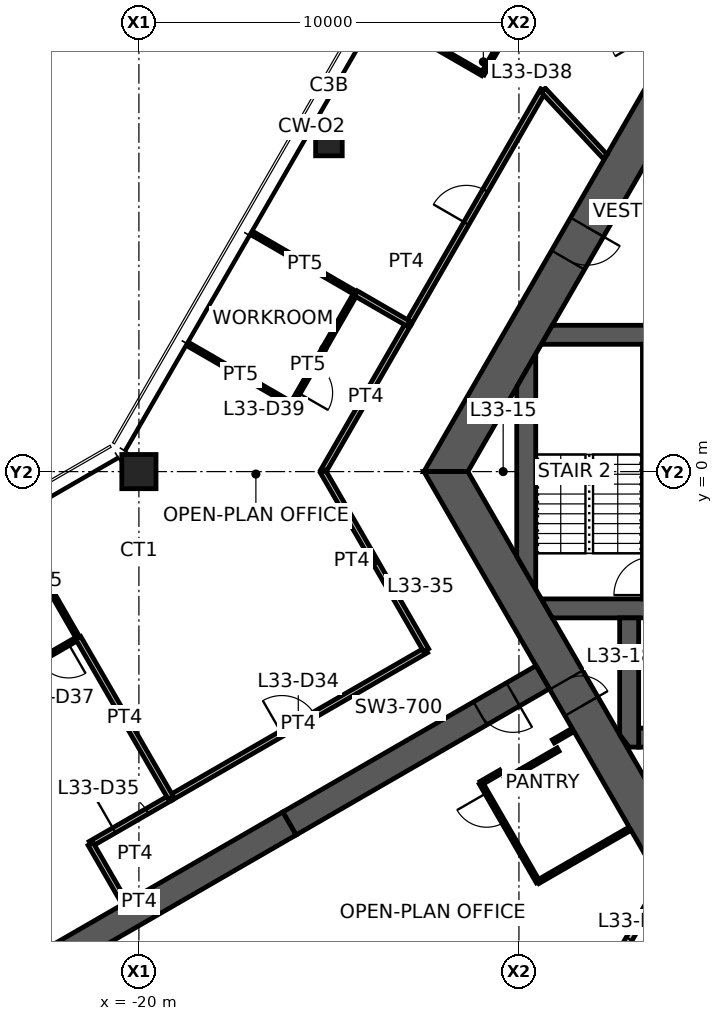
"""IFC4 building model, lengths in metres.
Left out: names, types, materials, properties, quantities, classifications, styles, units other than length and angle.
Written with IfcOpenShell. Run it as: python <this file> out.ifc"""

import sys

from ifc_helpers import new_model, si_unit, direction, frame, frame_2d, origin, origin_2d, place, context, subcontext, project, spatial, polyline, rectangle, hollow_rectangle, outline, extrude, element, fill, save


model = new_model("IFC4")
c1 = context("Model", 3, precision=1e-05, world=origin(), true_north=direction((0.0, 1.0)))
c2 = subcontext(c1, "Body", "Model", "MODEL_VIEW")
j1 = project(units=[si_unit("LENGTHUNIT", "METRE"), si_unit("PLANEANGLEUNIT", "RADIAN")], contexts=[c1])
p1 = place(None, origin())
s1 = spatial("IfcSite", under=j1, at=p1, CompositionType="ELEMENT")
p2 = place(p1, origin())
s2 = spatial("IfcBuilding", under=s1, at=p2, CompositionType="ELEMENT")
p3 = place(p2, frame((0.0, 0.0, 133.1)))
s3 = spatial("IfcBuildingStorey", under=s2, at=p3, CompositionType="ELEMENT", Elevation=133.1)
p4 = place(p3, frame((-20.0, 0.0, 0.0), z_axis=(0.0, 0.0, 1.0), x_axis=(1.0, 0.0, 0.0)))
e1 = element("IfcColumn", 1, at=p4, inside=s3, PredefinedType="COLUMN", context=c2, shape_type="SweptSolid", body=[
    extrude(hollow_rectangle(XDim=0.9, YDim=0.9, WallThickness=0.07, at=origin_2d()), origin(), (0.0, 0.0, 1.0), 3.9),
])
p5 = place(p3, frame((-15.0, 8.66, 0.0), z_axis=(0.0, 0.0, 1.0), x_axis=(1.0, 0.0, 0.0)))
e2 = element("IfcColumn", 2, at=p5, inside=s3, PredefinedType="COLUMN", context=c2, shape_type="SweptSolid", body=[
    extrude(hollow_rectangle(XDim=0.7, YDim=0.7, WallThickness=0.036, at=origin_2d()), origin(), (0.0, 0.0, 1.0), 3.9),
])
p6 = place(p3, frame((-5.961, 10.325, 0.0), z_axis=(0.0, 0.0, 1.0), x_axis=(-0.500004296715, -0.866022923061, 0.0)))
e3 = element("IfcWall", 3, at=p6, inside=s3, PredefinedType="SHEAR", context=c2, shape_type="SweptSolid", body=[
    extrude(outline(polyline([(-0.289, -0.5), (4.494, -0.5), (5.494, -0.5), (12.211, -0.5), (11.634, 0.5), (5.494, 0.5), (4.494, 0.5), (0.289, 0.5), (-0.289, -0.5)])), origin(), (0.0, 0.0, 1.0), 3.9),
])
p7 = place(p6, frame((4.494, 0.0, 0.0)))
e4 = element("IfcOpeningElement", 4, at=p7, cuts=e3, PredefinedType="OPENING", context=c2, shape_type="SweptSolid", body=[
    extrude(rectangle(XDim=1.0, YDim=2.1, at=frame_2d((0.5, 1.05))), frame((0.0, 0.51, 0.0), z_axis=(0.0, -1.0, 0.0), x_axis=(1.0, 0.0, 0.0)), (0.0, 0.0, 1.0), 1.02),
])
p8 = place(p3, frame((-11.922, 0.0, 0.0), z_axis=(0.0, 0.0, 1.0), x_axis=(0.500004296715, -0.866022923061, 0.0)))
e5 = element("IfcWall", 5, at=p8, inside=s3, PredefinedType="SHEAR", context=c2, shape_type="SweptSolid", body=[
    extrude(outline(polyline([(-0.289, -0.5), (6.331, -0.5), (7.131, -0.5), (12.211, -0.5), (11.634, 0.5), (7.131, 0.5), (6.331, 0.5), (0.289, 0.5), (-0.289, -0.5)])), origin(), (0.0, 0.0, 1.0), 3.9),
])
p9 = place(p8, frame((6.331, 0.0, 0.0)))
e6 = element("IfcOpeningElement", 6, at=p9, cuts=e5, PredefinedType="OPENING", context=c2, shape_type="SweptSolid", body=[
    extrude(rectangle(XDim=0.8, YDim=2.1, at=frame_2d((0.4, 1.05))), frame((0.0, 0.51, 0.0), z_axis=(0.0, -1.0, 0.0), x_axis=(1.0, 0.0, 0.0)), (0.0, 0.0, 1.0), 1.02),
])
p10 = place(p3, frame((-9.375, -5.413, 0.0), z_axis=(0.0, 0.0, 1.0), x_axis=(-0.866032377459, -0.499987921047, 0.0)))
e7 = element("IfcWall", 7, at=p10, inside=s3, PredefinedType="SHEAR", context=c2, shape_type="SweptSolid", body=[
    extrude(rectangle(XDim=7.696, YDim=0.7, at=frame_2d((3.848, 0.0))), origin(), (0.0, 0.0, 1.0), 3.9),
])
p11 = place(p10, frame((0.9, 0.0, 0.0)))
e8 = element("IfcOpeningElement", 8, at=p11, cuts=e7, PredefinedType="OPENING", context=c2, shape_type="SweptSolid", body=[
    extrude(rectangle(XDim=1.0, YDim=2.1, at=frame_2d((0.5, 1.05))), frame((0.0, 0.36, 0.0), z_axis=(0.0, -1.0, 0.0), x_axis=(1.0, 0.0, 0.0)), (0.0, 0.0, 1.0), 0.72),
])
p12 = place(p3, frame((-16.039, -9.26, 0.0), z_axis=(0.0, 0.0, 1.0), x_axis=(-0.866024837091, -0.50000098154, 0.0)))
e9 = element("IfcWall", 9, at=p12, inside=s3, PredefinedType="SHEAR", context=c2, shape_type="SweptSolid", body=[
    extrude(rectangle(XDim=13.0, YDim=0.7, at=frame_2d((6.5, 0.0))), origin(), (0.0, 0.0, 1.0), 3.9),
])
p13 = place(p3, frame((-9.266, 3.6, 0.0), z_axis=(0.0, 0.0, 1.0), x_axis=(1.0, 0.0, 0.0)))
e10 = element("IfcWall", 10, at=p13, inside=s3, PredefinedType="SHEAR", context=c2, shape_type="SweptSolid", body=[
    extrude(outline(polyline([(-0.144, -0.25), (3.266, -0.25), (4.266, -0.25), (5.667, -0.25), (6.767, -0.25), (7.916, -0.25), (7.916, 0.25), (6.767, 0.25), (5.667, 0.25), (4.266, 0.25), (3.266, 0.25), (0.144, 0.25), (-0.144, -0.25)])), origin(), (0.0, 0.0, 1.0), 3.9),
])
p14 = place(p13, frame((3.266, 0.0, 0.0)))
e11 = element("IfcOpeningElement", 11, at=p14, cuts=e10, PredefinedType="OPENING", context=c2, shape_type="SweptSolid", body=[
    extrude(rectangle(XDim=1.0, YDim=2.1, at=frame_2d((0.5, 1.05))), frame((0.0, 0.26, 0.0), z_axis=(0.0, -1.0, 0.0), x_axis=(1.0, 0.0, 0.0)), (0.0, 0.0, 1.0), 0.52),
])
p15 = place(p13, frame((5.667, 0.0, 0.0)))
e12 = element("IfcOpeningElement", 12, at=p15, cuts=e10, PredefinedType="OPENING", context=c2, shape_type="SweptSolid", body=[
    extrude(rectangle(XDim=1.1, YDim=2.1, at=frame_2d((0.55, 1.05))), frame((0.0, 0.26, 0.0), z_axis=(0.0, -1.0, 0.0), x_axis=(1.0, 0.0, 0.0)), (0.0, 0.0, 1.0), 0.52),
])
p16 = place(p3, frame((-9.266, -3.6, 0.0), z_axis=(0.0, 0.0, 1.0), x_axis=(1.0, 0.0, 0.0)))
e13 = element("IfcWall", 13, at=p16, inside=s3, PredefinedType="SHEAR", context=c2, shape_type="SweptSolid", body=[
    extrude(outline(polyline([(0.144, -0.25), (3.116, -0.25), (4.417, -0.25), (5.667, -0.25), (6.767, -0.25), (7.916, -0.25), (7.916, 0.25), (6.767, 0.25), (5.667, 0.25), (4.417, 0.25), (3.116, 0.25), (-0.144, 0.25), (0.144, -0.25)])), origin(), (0.0, 0.0, 1.0), 3.9),
])
p17 = place(p16, frame((5.667, 0.0, 0.0)))
e14 = element("IfcOpeningElement", 14, at=p17, cuts=e13, PredefinedType="OPENING", context=c2, shape_type="SweptSolid", body=[
    extrude(rectangle(XDim=1.1, YDim=2.1, at=frame_2d((0.55, 1.05))), frame((0.0, 0.26, 0.0), z_axis=(0.0, -1.0, 0.0), x_axis=(1.0, 0.0, 0.0)), (0.0, 0.0, 1.0), 0.52),
])
p18 = place(p16, frame((3.116, 0.0, 0.0)))
e15 = element("IfcOpeningElement", 15, at=p18, cuts=e13, PredefinedType="OPENING", context=c2, shape_type="SweptSolid", body=[
    extrude(rectangle(XDim=1.3, YDim=2.1, at=frame_2d((0.65, 1.05))), frame((0.0, 0.26, 0.0), z_axis=(0.0, -1.0, 0.0), x_axis=(1.0, 0.0, 0.0)), (0.0, 0.0, 1.0), 0.52),
])
p19 = place(p3, frame((-6.5, -3.35, 0.0), z_axis=(0.0, 0.0, 1.0), x_axis=(0.0, 1.0, 0.0)))
e16 = element("IfcWall", 16, at=p19, inside=s3, PredefinedType="SHEAR", context=c2, shape_type="SweptSolid", body=[
    extrude(rectangle(XDim=6.7, YDim=0.5, at=frame_2d((3.35, 0.0))), origin(), (0.0, 0.0, 1.0), 3.9),
])
p20 = place(p19, frame((0.1, 0.0, 0.0)))
e17 = element("IfcOpeningElement", 17, at=p20, cuts=e16, PredefinedType="OPENING", context=c2, shape_type="SweptSolid", body=[
    extrude(rectangle(XDim=1.0, YDim=2.1, at=frame_2d((0.5, 1.05))), frame((0.0, 0.26, 0.0), z_axis=(0.0, -1.0, 0.0), x_axis=(1.0, 0.0, 0.0)), (0.0, 0.0, 1.0), 0.52),
])
p21 = place(p3, frame((-6.85, -7.0, 0.0), z_axis=(0.0, 0.0, 1.0), x_axis=(1.0, 0.0, 0.0)))
e18 = element("IfcWall", 18, at=p21, inside=s3, PredefinedType="SHEAR", context=c2, shape_type="SweptSolid", body=[
    extrude(rectangle(XDim=2.1, YDim=0.5, at=frame_2d((1.05, 0.0))), origin(), (0.0, 0.0, 1.0), 3.9),
])
p22 = place(p3, frame((-7.1, -3.85, 0.0), z_axis=(0.0, 0.0, 1.0), x_axis=(0.0, -1.0, 0.0)))
e19 = element("IfcWall", 19, at=p22, inside=s3, PredefinedType="SHEAR", context=c2, shape_type="SweptSolid", body=[
    extrude(outline(polyline([(0.0, -0.25), (3.069, -0.25), (3.4, 0.0), (3.4, 0.25), (0.0, 0.25), (0.0, -0.25)])), origin(), (0.0, 0.0, 1.0), 3.9),
])
p23 = place(p3, frame((-9.808, -2.662, 0.0), z_axis=(0.0, 0.0, 1.0), x_axis=(0.0, 1.0, 0.0)))
e20 = element("IfcWall", 20, at=p23, inside=s3, PredefinedType="SHEAR", context=c2, shape_type="SweptSolid", body=[
    extrude(outline(polyline([(-0.433, -0.25), (5.758, -0.25), (4.892, 0.25), (0.433, 0.25), (-0.433, -0.25)])), origin(), (0.0, 0.0, 1.0), 3.9),
])
p24 = place(p3, frame((-6.035, 10.453, 0.0), z_axis=(0.0, 0.0, 1.0), x_axis=(-0.499989830942, 0.866031274813, 0.0)))
e21 = element("IfcWall", 21, at=p24, inside=s3, PredefinedType="PARTITIONING", context=c2, shape_type="SweptSolid", body=[
    extrude(rectangle(XDim=7.93, YDim=0.175, at=frame_2d((3.965, 0.0))), origin(), (0.0, 0.0, 1.0), 3.05),
])
p25 = place(p24, frame((1.13, 0.0, 0.0)))
e22 = element("IfcOpeningElement", 22, at=p25, cuts=e21, PredefinedType="OPENING", context=c2, shape_type="SweptSolid", body=[
    extrude(rectangle(XDim=1.0, YDim=2.1, at=frame_2d((0.5, 1.05))), frame((0.0, 0.098, 0.0), z_axis=(0.0, -1.0, 0.0), x_axis=(1.0, 0.0, 0.0)), (0.0, 0.0, 1.0), 0.195),
])
p26 = place(p3, frame((-6.035, -10.453, 0.0), z_axis=(0.0, 0.0, 1.0), x_axis=(-0.499989830942, -0.866031274813, 0.0)))
e23 = element("IfcWall", 23, at=p26, inside=s3, PredefinedType="PARTITIONING", context=c2, shape_type="SweptSolid", body=[
    extrude(rectangle(XDim=7.93, YDim=0.175, at=frame_2d((3.965, 0.0))), origin(), (0.0, 0.0, 1.0), 3.05),
])
p27 = place(p26, frame((1.13, 0.0, 0.0)))
e24 = element("IfcOpeningElement", 24, at=p27, cuts=e23, PredefinedType="OPENING", context=c2, shape_type="SweptSolid", body=[
    extrude(rectangle(XDim=1.0, YDim=2.1, at=frame_2d((0.5, 1.05))), frame((0.0, 0.098, 0.0), z_axis=(0.0, -1.0, 0.0), x_axis=(1.0, 0.0, 0.0)), (0.0, 0.0, 1.0), 0.195),
])
p28 = place(p3, frame((-19.171, -8.586, 0.0), z_axis=(0.0, 0.0, 1.0), x_axis=(0.866007176269, 0.500031569654, 0.0)))
e25 = element("IfcWall", 25, at=p28, inside=s3, PredefinedType="PARTITIONING", context=c2, shape_type="SweptSolid", body=[
    extrude(rectangle(XDim=7.771, YDim=0.15, at=frame_2d((3.885, 0.0))), origin(), (0.0, 0.0, 1.0), 2.95),
])
p29 = place(p28, frame((3.385, 0.0, 0.0)))
e26 = element("IfcOpeningElement", 26, at=p29, cuts=e25, PredefinedType="OPENING", context=c2, shape_type="SweptSolid", body=[
    extrude(rectangle(XDim=1.0, YDim=2.1, at=frame_2d((0.5, 1.05))), frame((0.0, 0.085, 0.0), z_axis=(0.0, -1.0, 0.0), x_axis=(1.0, 0.0, 0.0)), (0.0, 0.0, 1.0), 0.17),
])
p30 = place(p3, frame((-15.156, 0.0, 0.0), z_axis=(0.0, 0.0, 1.0), x_axis=(0.500014848696, 0.866016830716, 0.0)))
e27 = element("IfcWall", 27, at=p30, inside=s3, PredefinedType="PARTITIONING", context=c2, shape_type="SweptSolid", body=[
    extrude(rectangle(XDim=4.505, YDim=0.15, at=frame_2d((2.252, 0.0))), origin(), (0.0, 0.0, 1.0), 2.95),
])
p31 = place(p3, frame((-12.442, -4.7, 0.0), z_axis=(0.0, 0.0, 1.0), x_axis=(-0.500009286329, 0.866020042254, 0.0)))
e28 = element("IfcWall", 28, at=p31, inside=s3, PredefinedType="PARTITIONING", context=c2, shape_type="SweptSolid", body=[
    extrude(rectangle(XDim=5.428, YDim=0.15, at=frame_2d((2.714, 0.0))), origin(), (0.0, 0.0, 1.0), 2.95),
])
p32 = place(p3, frame((-21.271, -9.798, 0.0), z_axis=(0.0, 0.0, 1.0), x_axis=(0.866025270247, 0.500000231294, 0.0)))
e29 = element("IfcWall", 29, at=p32, inside=s3, PredefinedType="PARTITIONING", context=c2, shape_type="SweptSolid", body=[
    extrude(rectangle(XDim=2.435, YDim=0.15, at=frame_2d((1.217, 0.0))), origin(), (0.0, 0.0, 1.0), 2.95),
])
p33 = place(p32, frame((0.717, 0.0, 0.0)))
e30 = element("IfcOpeningElement", 30, at=p33, cuts=e29, PredefinedType="OPENING", context=c2, shape_type="SweptSolid", body=[
    extrude(rectangle(XDim=1.0, YDim=2.1, at=frame_2d((0.5, 1.05))), frame((0.0, 0.085, 0.0), z_axis=(0.0, -1.0, 0.0), x_axis=(1.0, 0.0, 0.0)), (0.0, 0.0, 1.0), 0.17),
])
p34 = place(p3, frame((-20.381, -11.34, 0.0), z_axis=(0.0, 0.0, 1.0), x_axis=(-0.500062787734, 0.865989150234, 0.0)))
e31 = element("IfcWall", 31, at=p34, inside=s3, PredefinedType="PARTITIONING", context=c2, shape_type="SweptSolid", body=[
    extrude(rectangle(XDim=1.78, YDim=0.15, at=frame_2d((0.89, 0.0))), origin(), (0.0, 0.0, 1.0), 2.95),
])
p35 = place(p3, frame((-12.908, 3.893, 0.0), z_axis=(0.0, 0.0, 1.0), x_axis=(0.500006411147, 0.866021702275, 0.0)))
e32 = element("IfcWall", 32, at=p35, inside=s3, PredefinedType="PARTITIONING", context=c2, shape_type="SweptSolid", body=[
    extrude(rectangle(XDim=7.095, YDim=0.15, at=frame_2d((3.548, 0.0))), origin(), (0.0, 0.0, 1.0), 2.95),
])
p36 = place(p35, frame((3.047, 0.0, 0.0)))
e33 = element("IfcOpeningElement", 33, at=p36, cuts=e32, PredefinedType="OPENING", context=c2, shape_type="SweptSolid", body=[
    extrude(rectangle(XDim=1.0, YDim=2.1, at=frame_2d((0.5, 1.05))), frame((0.0, 0.085, 0.0), z_axis=(0.0, -1.0, 0.0), x_axis=(1.0, 0.0, 0.0)), (0.0, 0.0, 1.0), 0.17),
])
p37 = place(p3, frame((-9.36, 10.038, 0.0), z_axis=(0.0, 0.0, 1.0), x_axis=(0.681997114248, -0.731354863358, 0.0)))
e34 = element("IfcWall", 34, at=p37, inside=s3, PredefinedType="PARTITIONING", context=c2, shape_type="SweptSolid", body=[
    extrude(outline(polyline([(0.0, -0.075), (2.384, -0.075), (2.384, 0.0), (2.382, 0.075), (0.0, 0.075), (0.0, -0.075)])), origin(), (0.0, 0.0, 1.0), 2.95),
])
p38 = place(p3, frame((-23.332, -1.37, 0.0), z_axis=(0.0, 0.0, 1.0), x_axis=(0.498863855434, -0.86668036423, 0.0)))
e35 = element("IfcWall", 35, at=p38, inside=s3, PredefinedType="PARTITIONING", context=c2, shape_type="SweptSolid", body=[
    extrude(rectangle(XDim=3.48, YDim=0.1, at=frame_2d((1.74, 0.0))), origin(), (0.0, 0.0, 1.0), 2.95),
])
p39 = place(p3, frame((-21.594, -4.379, 0.0), z_axis=(0.0, 0.0, 1.0), x_axis=(-0.865682888643, -0.500592784916, 0.0)))
e36 = element("IfcWall", 36, at=p39, inside=s3, PredefinedType="PARTITIONING", context=c2, shape_type="SweptSolid", body=[
    extrude(rectangle(XDim=6.62, YDim=0.1, at=frame_2d((3.31, 0.0))), origin(), (0.0, 0.0, 1.0), 2.95),
])
p40 = place(p39, frame((0.3, 0.0, 0.0)))
e37 = element("IfcOpeningElement", 37, at=p40, cuts=e36, PredefinedType="OPENING", context=c2, shape_type="SweptSolid", body=[
    extrude(rectangle(XDim=0.9, YDim=2.1, at=frame_2d((0.45, 1.05))), frame((0.0, 0.06, 0.0), z_axis=(0.0, -1.0, 0.0), x_axis=(1.0, 0.0, 0.0)), (0.0, 0.0, 1.0), 0.12),
])
p41 = place(p3, frame((-10.956, 10.465, 0.0), z_axis=(0.0, 0.0, 1.0), x_axis=(-0.866012296238, 0.500022702249, 0.0)))
e38 = element("IfcWall", 38, at=p41, inside=s3, PredefinedType="PARTITIONING", context=c2, shape_type="SweptSolid", body=[
    extrude(rectangle(XDim=3.144, YDim=0.1, at=frame_2d((1.572, 0.0))), origin(), (0.0, 0.0, 1.0), 2.95),
])
p42 = place(p3, frame((-9.291, 13.349, 0.0), z_axis=(0.0, 0.0, 1.0), x_axis=(-0.500033344505, -0.86600615147, 0.0)))
e39 = element("IfcWall", 39, at=p42, inside=s3, PredefinedType="PARTITIONING", context=c2, shape_type="SweptSolid", body=[
    extrude(rectangle(XDim=3.331, YDim=0.1, at=frame_2d((1.666, 0.0))), origin(), (0.0, 0.0, 1.0), 2.95),
])
p43 = place(p42, frame((0.3, 0.0, 0.0)))
e40 = element("IfcOpeningElement", 40, at=p43, cuts=e39, PredefinedType="OPENING", context=c2, shape_type="SweptSolid", body=[
    extrude(rectangle(XDim=0.9, YDim=2.1, at=frame_2d((0.45, 1.05))), frame((0.0, 0.06, 0.0), z_axis=(0.0, -1.0, 0.0), x_axis=(1.0, 0.0, 0.0)), (0.0, 0.0, 1.0), 0.12),
])
p44 = place(p3, frame((-15.974, 1.773, 0.0), z_axis=(0.0, 0.0, 1.0), x_axis=(-0.866032025414, 0.499988530825, 0.0)))
e41 = element("IfcWall", 41, at=p44, inside=s3, PredefinedType="PARTITIONING", context=c2, shape_type="SweptSolid", body=[
    extrude(rectangle(XDim=3.124, YDim=0.1, at=frame_2d((1.562, 0.0))), origin(), (0.0, 0.0, 1.0), 2.95),
])
p45 = place(p3, frame((-14.291, 4.698, 0.0), z_axis=(0.0, 0.0, 1.0), x_axis=(-0.498809626432, -0.86671157635, 0.0)))
e42 = element("IfcWall", 42, at=p45, inside=s3, PredefinedType="PARTITIONING", context=c2, shape_type="SweptSolid", body=[
    extrude(rectangle(XDim=3.374, YDim=0.1, at=frame_2d((1.687, 0.0))), origin(), (0.0, 0.0, 1.0), 2.95),
])
p46 = place(p45, frame((2.131, 0.0, 0.0)))
e43 = element("IfcOpeningElement", 43, at=p46, cuts=e42, PredefinedType="OPENING", context=c2, shape_type="SweptSolid", body=[
    extrude(rectangle(XDim=0.9, YDim=2.1, at=frame_2d((0.45, 1.05))), frame((0.0, 0.06, 0.0), z_axis=(0.0, -1.0, 0.0), x_axis=(1.0, 0.0, 0.0)), (0.0, 0.0, 1.0), 0.12),
])
p47 = place(p3, frame((-16.976, 6.248, 0.0), z_axis=(0.0, 0.0, 1.0), x_axis=(0.865232439327, -0.501370946442, 0.0)))
e44 = element("IfcWall", 44, at=p47, inside=s3, PredefinedType="PARTITIONING", context=c2, shape_type="SweptSolid", body=[
    extrude(rectangle(XDim=3.105, YDim=0.1, at=frame_2d((1.553, 0.0))), origin(), (0.0, 0.0, 1.0), 2.95),
])
p48 = place(p3, frame((-19.163, -8.581, 0.0), z_axis=(0.0, 0.0, 1.0), x_axis=(-0.500843945189, 0.865537603209, 0.0)))
e45 = element("IfcWall", 45, at=p48, inside=s3, PredefinedType="PARTITIONING", context=c2, shape_type="SweptSolid", body=[
    extrude(rectangle(XDim=4.854, YDim=0.15, at=frame_2d((2.427, 0.0))), origin(), (0.0, 0.0, 1.0), 2.95),
])
p49 = place(p3, frame((-14.289, 4.691, 0.0), z_axis=(0.0, 0.0, 1.0), x_axis=(0.865925490132, -0.500173015605, 0.0)))
e46 = element("IfcWall", 46, at=p49, inside=s3, PredefinedType="PARTITIONING", context=c2, shape_type="SweptSolid", body=[
    extrude(rectangle(XDim=1.595, YDim=0.15, at=frame_2d((0.797, 0.0))), origin(), (0.0, 0.0, 1.0), 2.95),
])
p50 = place(p3, frame((-11.0, -8.198, 0.0), z_axis=(0.0, 0.0, 1.0), x_axis=(0.866131372301, 0.499816412211, 0.0)))
e47 = element("IfcWall", 47, at=p50, inside=s3, PredefinedType="PARTITIONING", context=c2, shape_type="SweptSolid", body=[
    extrude(rectangle(XDim=0.6, YDim=0.1, at=frame_2d((0.3, 0.0))), origin(), (0.0, 0.0, 1.0), 2.95),
])
p51 = place(p3, frame((-10.355, -8.115, 0.0), z_axis=(0.0, 0.0, 1.0), x_axis=(0.866094119867, 0.499880961361, 0.0)))
e48 = element("IfcWall", 48, at=p51, inside=s3, PredefinedType="PARTITIONING", context=c2, shape_type="SweptSolid", body=[
    extrude(rectangle(XDim=1.6, YDim=0.1, at=frame_2d((0.8, 0.0))), origin(), (0.0, 0.0, 1.0), 2.95),
])
p52 = place(p3, frame((-9.5, -10.796, 0.0), z_axis=(0.0, 0.0, 1.0), x_axis=(-0.499990139034, 0.866031096941, 0.0)))
e49 = element("IfcWall", 49, at=p52, inside=s3, PredefinedType="PARTITIONING", context=c2, shape_type="SweptSolid", body=[
    extrude(rectangle(XDim=3.0, YDim=0.1, at=frame_2d((1.5, 0.0))), origin(), (0.0, 0.0, 1.0), 2.95),
])
p53 = place(p52, frame((1.8, 0.0, 0.0)))
e50 = element("IfcOpeningElement", 50, at=p53, cuts=e49, PredefinedType="OPENING", context=c2, shape_type="SweptSolid", body=[
    extrude(rectangle(XDim=0.9, YDim=2.1, at=frame_2d((0.45, 1.05))), frame((0.0, 0.06, 0.0), z_axis=(0.0, -1.0, 0.0), x_axis=(1.0, 0.0, 0.0)), (0.0, 0.0, 1.0), 0.12),
])
p54 = place(p3, frame((-9.094, -7.098, 0.0), z_axis=(0.0, 0.0, 1.0), x_axis=(0.865954211699, 0.50012328804, 0.0)))
e51 = element("IfcWall", 51, at=p54, inside=s3, PredefinedType="PARTITIONING", context=c2, shape_type="SweptSolid", body=[
    extrude(rectangle(XDim=0.58, YDim=0.1, at=frame_2d((0.29, 0.0))), origin(), (0.0, 0.0, 1.0), 2.95),
])
p55 = place(p3, frame((-7.092, -9.406, 0.0), z_axis=(0.0, 0.0, 1.0), x_axis=(-0.86603494908, -0.499983466698, 0.0)))
e52 = element("IfcWall", 52, at=p55, inside=s3, PredefinedType="PARTITIONING", context=c2, shape_type="SweptSolid", body=[
    extrude(rectangle(XDim=2.78, YDim=0.1, at=frame_2d((1.39, 0.0))), origin(), (0.0, 0.0, 1.0), 2.95),
])
p56 = place(p9, origin())
e53 = element("IfcDoor", 53, at=p56, inside=s3, OperationType="SINGLE_SWING_RIGHT", PredefinedType="DOOR", context=c2, shape_type="SweptSolid", body=[
    extrude(rectangle(XDim=0.8, YDim=2.1, at=frame_2d((0.4, 1.05))), frame((0.0, 0.025, 0.0), z_axis=(0.0, -1.0, 0.0), x_axis=(1.0, 0.0, 0.0)), (0.0, 0.0, 1.0), 0.05),
])
fill(e6, e53)
p57 = place(p7, origin())
e54 = element("IfcDoor", 54, at=p57, inside=s3, OperationType="SINGLE_SWING_LEFT", PredefinedType="DOOR", context=c2, shape_type="SweptSolid", body=[
    extrude(rectangle(XDim=1.0, YDim=2.1, at=frame_2d((0.5, 1.05))), frame((0.0, 0.025, 0.0), z_axis=(0.0, -1.0, 0.0), x_axis=(1.0, 0.0, 0.0)), (0.0, 0.0, 1.0), 0.05),
])
fill(e4, e54)
p58 = place(p11, origin())
e55 = element("IfcDoor", 55, at=p58, inside=s3, OperationType="SINGLE_SWING_LEFT", PredefinedType="DOOR", context=c2, shape_type="SweptSolid", body=[
    extrude(rectangle(XDim=1.0, YDim=2.1, at=frame_2d((0.5, 1.05))), frame((0.0, 0.025, 0.0), z_axis=(0.0, -1.0, 0.0), x_axis=(1.0, 0.0, 0.0)), (0.0, 0.0, 1.0), 0.05),
])
fill(e8, e55)
p59 = place(p27, origin())
e56 = element("IfcDoor", 56, at=p59, inside=s3, OperationType="SINGLE_SWING_LEFT", PredefinedType="DOOR", context=c2, shape_type="SweptSolid", body=[
    extrude(rectangle(XDim=1.0, YDim=2.1, at=frame_2d((0.5, 1.05))), frame((0.0, 0.025, 0.0), z_axis=(0.0, -1.0, 0.0), x_axis=(1.0, 0.0, 0.0)), (0.0, 0.0, 1.0), 0.05),
])
fill(e24, e56)
p60 = place(p29, origin())
e57 = element("IfcDoor", 57, at=p60, inside=s3, OperationType="SINGLE_SWING_LEFT", PredefinedType="DOOR", context=c2, shape_type="SweptSolid", body=[
    extrude(rectangle(XDim=1.0, YDim=2.1, at=frame_2d((0.5, 1.05))), frame((0.0, 0.025, 0.0), z_axis=(0.0, -1.0, 0.0), x_axis=(1.0, 0.0, 0.0)), (0.0, 0.0, 1.0), 0.05),
])
fill(e26, e57)
p61 = place(p33, origin())
e58 = element("IfcDoor", 58, at=p61, inside=s3, OperationType="SINGLE_SWING_LEFT", PredefinedType="DOOR", context=c2, shape_type="SweptSolid", body=[
    extrude(rectangle(XDim=1.0, YDim=2.1, at=frame_2d((0.5, 1.05))), frame((0.0, 0.025, 0.0), z_axis=(0.0, -1.0, 0.0), x_axis=(1.0, 0.0, 0.0)), (0.0, 0.0, 1.0), 0.05),
])
fill(e30, e58)
p62 = place(p36, origin())
e59 = element("IfcDoor", 59, at=p62, inside=s3, OperationType="SINGLE_SWING_LEFT", PredefinedType="DOOR", context=c2, shape_type="SweptSolid", body=[
    extrude(rectangle(XDim=1.0, YDim=2.1, at=frame_2d((0.5, 1.05))), frame((0.0, 0.025, 0.0), z_axis=(0.0, -1.0, 0.0), x_axis=(1.0, 0.0, 0.0)), (0.0, 0.0, 1.0), 0.05),
])
fill(e33, e59)
p63 = place(p40, origin())
e60 = element("IfcDoor", 60, at=p63, inside=s3, OperationType="SINGLE_SWING_LEFT", PredefinedType="DOOR", context=c2, shape_type="SweptSolid", body=[
    extrude(rectangle(XDim=0.9, YDim=2.1, at=frame_2d((0.45, 1.05))), frame((0.0, 0.025, 0.0), z_axis=(0.0, -1.0, 0.0), x_axis=(1.0, 0.0, 0.0)), (0.0, 0.0, 1.0), 0.05),
])
fill(e37, e60)
p64 = place(p46, origin())
e61 = element("IfcDoor", 61, at=p64, inside=s3, OperationType="SINGLE_SWING_RIGHT", PredefinedType="DOOR", context=c2, shape_type="SweptSolid", body=[
    extrude(rectangle(XDim=0.9, YDim=2.1, at=frame_2d((0.45, 1.05))), frame((0.0, 0.025, 0.0), z_axis=(0.0, -1.0, 0.0), x_axis=(1.0, 0.0, 0.0)), (0.0, 0.0, 1.0), 0.05),
])
fill(e43, e61)
p65 = place(p53, origin())
e62 = element("IfcDoor", 62, at=p65, inside=s3, OperationType="SINGLE_SWING_RIGHT", PredefinedType="DOOR", context=c2, shape_type="SweptSolid", body=[
    extrude(rectangle(XDim=0.9, YDim=2.1, at=frame_2d((0.45, 1.05))), frame((0.0, 0.025, 0.0), z_axis=(0.0, -1.0, 0.0), x_axis=(1.0, 0.0, 0.0)), (0.0, 0.0, 1.0), 0.05),
])
fill(e50, e62)
save(model, sys.argv[1])
